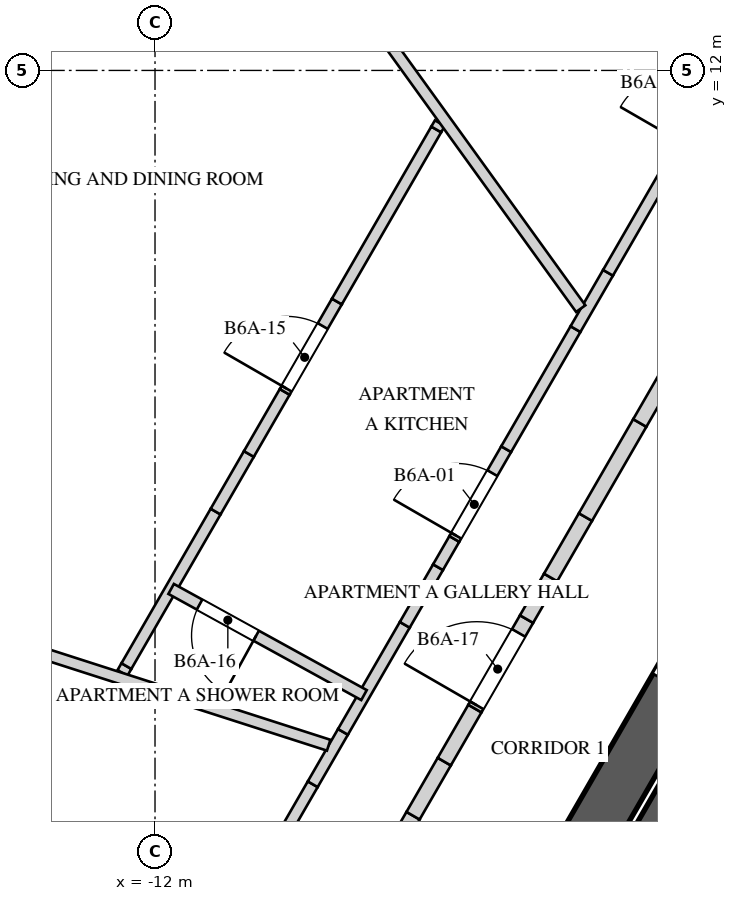
"""IFC4 building model, lengths in metres.
Left out: names, types, materials, properties, quantities, classifications, styles, units other than length and angle.
Written with IfcOpenShell. Run it as: python <this file> out.ifc"""

import sys

from ifc_helpers import new_model, si_unit, direction, frame, frame_2d, origin, place, context, subcontext, project, spatial, polyline, rectangle, outline, extrude, element, fill, save


model = new_model("IFC4")
c1 = context("Model", 3, precision=1e-05, world=origin(), true_north=direction((0.0, 1.0)))
c2 = subcontext(c1, "Body", "Model", "MODEL_VIEW")
j1 = project(units=[si_unit("LENGTHUNIT", "METRE"), si_unit("PLANEANGLEUNIT", "RADIAN")], contexts=[c1])
p1 = place(None, origin())
s1 = spatial("IfcSite", under=j1, at=p1, CompositionType="ELEMENT")
p2 = place(p1, origin())
s2 = spatial("IfcBuilding", under=s1, at=p2, CompositionType="ELEMENT")
p3 = place(p2, frame((0.0, 0.0, 245.2)))
s3 = spatial("IfcBuildingStorey", under=s2, at=p3, CompositionType="ELEMENT", Elevation=245.2)
p4 = place(p3, frame((-1.241, 10.65, 0.0), z_axis=(0.0, 0.0, 1.0), x_axis=(-0.500003331888, -0.866023480109, 0.0)))
e1 = element("IfcWall", 1, at=p4, inside=s3, PredefinedType="SHEAR", context=c2, shape_type="SweptSolid", body=[
    extrude(rectangle(XDim=17.205, YDim=0.7, at=frame_2d((8.603, 0.0))), origin(), (0.0, 0.0, 1.0), 4.0),
])
p5 = place(p4, frame((6.808, 0.0, 0.0)))
e2 = element("IfcOpeningElement", 2, at=p5, cuts=e1, PredefinedType="OPENING", context=c2, shape_type="SweptSolid", body=[
    extrude(rectangle(XDim=1.0, YDim=2.4, at=frame_2d((0.5, 1.2))), frame((0.0, 0.36, 0.0), z_axis=(0.0, -1.0, 0.0), x_axis=(1.0, 0.0, 0.0)), (0.0, 0.0, 1.0), 0.72),
])
p6 = place(p4, frame((14.922, 0.0, 0.0)))
e3 = element("IfcOpeningElement", 3, at=p6, cuts=e1, PredefinedType="OPENING", context=c2, shape_type="SweptSolid", body=[
    extrude(rectangle(XDim=0.8, YDim=2.1, at=frame_2d((0.4, 1.05))), frame((0.0, 0.36, 0.0), z_axis=(0.0, -1.0, 0.0), x_axis=(1.0, 0.0, 0.0)), (0.0, 0.0, 1.0), 0.72),
])
p7 = place(p3, frame((-4.538, 3.44, 0.0), z_axis=(0.0, 0.0, 1.0), x_axis=(-0.499996545922, -0.866027397988, 0.0)))
e4 = element("IfcWall", 4, at=p7, inside=s3, PredefinedType="SOLIDWALL", context=c2, shape_type="SweptSolid", body=[
    extrude(rectangle(XDim=5.5, YDim=0.6, at=frame_2d((2.75, 0.0))), origin(), (0.0, 0.0, 1.0), 3.65),
])
p8 = place(p3, frame((-12.213, -1.354, 0.0), z_axis=(0.0, 0.0, 1.0), x_axis=(0.500001111708, 0.866024761939, 0.0)))
e5 = element("IfcWall", 5, at=p8, inside=s3, PredefinedType="PARTITIONING", context=c2, shape_type="SweptSolid", body=[
    extrude(rectangle(XDim=4.576, YDim=0.15, at=frame_2d((2.288, 0.0))), origin(), (0.0, 0.0, 1.0), 3.65),
])
p9 = place(p8, frame((0.445, 0.0, 0.0)))
e6 = element("IfcOpeningElement", 6, at=p9, cuts=e5, PredefinedType="OPENING", context=c2, shape_type="SweptSolid", body=[
    extrude(rectangle(XDim=0.95, YDim=2.4, at=frame_2d((0.475, 1.2))), frame((0.0, 0.085, 0.0), z_axis=(0.0, -1.0, 0.0), x_axis=(1.0, 0.0, 0.0)), (0.0, 0.0, 1.0), 0.17),
])
p10 = place(p3, frame((-9.925, 2.609, 0.0), z_axis=(0.0, 0.0, 1.0), x_axis=(0.499802134818, 0.866139611167, 0.0)))
e7 = element("IfcWall", 7, at=p10, inside=s3, PredefinedType="PARTITIONING", context=c2, shape_type="SweptSolid", body=[
    extrude(rectangle(XDim=0.796, YDim=0.15, at=frame_2d((0.398, 0.0))), origin(), (0.0, 0.0, 1.0), 2.75),
])
p11 = place(p3, frame((-9.527, 3.298, 0.0), z_axis=(0.0, 0.0, 1.0), x_axis=(0.500094991843, 0.865970553272, 0.0)))
e8 = element("IfcWall", 8, at=p11, inside=s3, PredefinedType="PARTITIONING", context=c2, shape_type="SweptSolid", body=[
    extrude(rectangle(XDim=1.626, YDim=0.15, at=frame_2d((0.813, 0.0))), origin(), (0.0, 0.0, 1.0), 3.65),
])
p12 = place(p3, frame((-8.714, 4.707, 0.0), z_axis=(0.0, 0.0, 1.0), x_axis=(0.499859285417, 0.866106630146, 0.0)))
e9 = element("IfcWall", 9, at=p12, inside=s3, PredefinedType="PARTITIONING", context=c2, shape_type="SweptSolid", body=[
    extrude(rectangle(XDim=0.875, YDim=0.15, at=frame_2d((0.438, 0.0))), origin(), (0.0, 0.0, 1.0), 2.55),
])
p13 = place(p3, frame((-8.277, 5.465, 0.0), z_axis=(0.0, 0.0, 1.0), x_axis=(0.500116443366, 0.865958164737, 0.0)))
e10 = element("IfcWall", 10, at=p13, inside=s3, PredefinedType="PARTITIONING", context=c2, shape_type="SweptSolid", body=[
    extrude(rectangle(XDim=0.429, YDim=0.15, at=frame_2d((0.215, 0.0))), origin(), (0.0, 0.0, 1.0), 3.65),
])
p14 = place(p3, frame((-8.062, 5.836, 0.0), z_axis=(0.0, 0.0, 1.0), x_axis=(0.499970382458, 0.866042502805, 0.0)))
e11 = element("IfcWall", 11, at=p14, inside=s3, PredefinedType="PARTITIONING", context=c2, shape_type="SweptSolid", body=[
    extrude(outline(polyline([(0.0, 0.0), (1.364, 0.0), (1.364, 2.55), (0.472, 2.55), (0.472, 3.65), (0.0, 3.65), (0.0, 0.0)])), frame((0.0, 0.075, 0.0), z_axis=(0.0, -1.0, 0.0), x_axis=(1.0, 0.0, 0.0)), (0.0, 0.0, 1.0), 0.15),
])
p15 = place(p14, frame((0.05, 0.0, 0.0)))
e12 = element("IfcOpeningElement", 12, at=p15, cuts=e11, PredefinedType="OPENING", context=c2, shape_type="SweptSolid", body=[
    extrude(rectangle(XDim=0.95, YDim=2.4, at=frame_2d((0.475, 1.2))), frame((0.0, 0.085, 0.0), z_axis=(0.0, -1.0, 0.0), x_axis=(1.0, 0.0, 0.0)), (0.0, 0.0, 1.0), 0.17),
])
p16 = place(p3, frame((-7.38, 7.017, 0.0), z_axis=(0.0, 0.0, 1.0), x_axis=(0.500012159746, 0.866018383238, 0.0)))
e13 = element("IfcWall", 13, at=p16, inside=s3, PredefinedType="PARTITIONING", context=c2, shape_type="SweptSolid", body=[
    extrude(rectangle(XDim=1.824, YDim=0.15, at=frame_2d((0.912, 0.0))), origin(), (0.0, 0.0, 1.0), 3.65),
])
p17 = place(p3, frame((-6.468, 8.597, 0.0), z_axis=(0.0, 0.0, 1.0), x_axis=(0.500035209441, 0.86600507465, 0.0)))
e14 = element("IfcWall", 14, at=p17, inside=s3, PredefinedType="PARTITIONING", context=c2, shape_type="SweptSolid", body=[
    extrude(rectangle(XDim=0.856, YDim=0.15, at=frame_2d((0.428, 0.0))), origin(), (0.0, 0.0, 1.0), 2.75),
])
p18 = place(p3, frame((-6.04, 9.338, 0.0), z_axis=(0.0, 0.0, 1.0), x_axis=(0.500014044516, 0.866017295027, 0.0)))
e15 = element("IfcWall", 15, at=p18, inside=s3, PredefinedType="PARTITIONING", context=c2, shape_type="SweptSolid", body=[
    extrude(rectangle(XDim=5.556, YDim=0.15, at=frame_2d((2.778, 0.0))), origin(), (0.0, 0.0, 1.0), 3.65),
])
p19 = place(p18, frame((1.971, 0.0, 0.0)))
e16 = element("IfcOpeningElement", 16, at=p19, cuts=e15, PredefinedType="OPENING", context=c2, shape_type="SweptSolid", body=[
    extrude(rectangle(XDim=0.95, YDim=2.4, at=frame_2d((0.475, 1.2))), frame((0.0, 0.085, 0.0), z_axis=(0.0, -1.0, 0.0), x_axis=(1.0, 0.0, 0.0)), (0.0, 0.0, 1.0), 0.17),
])
p20 = place(p3, frame((-12.428, 4.074, 0.0), z_axis=(0.0, 0.0, 1.0), x_axis=(0.500943559977, 0.865479953388, 0.0)))
e17 = element("IfcWall", 17, at=p20, inside=s3, PredefinedType="PARTITIONING", context=c2, shape_type="SweptSolid", body=[
    extrude(rectangle(XDim=0.104, YDim=0.15, at=frame_2d((0.052, 0.0))), origin(), (0.0, 0.0, 1.0), 2.75),
])
p21 = place(p3, frame((-12.376, 4.164, 0.0), z_axis=(0.0, 0.0, 1.0), x_axis=(0.499998569178, 0.866026229868, 0.0)))
e18 = element("IfcWall", 18, at=p21, inside=s3, PredefinedType="PARTITIONING", context=c2, shape_type="SweptSolid", body=[
    extrude(rectangle(XDim=2.347, YDim=0.15, at=frame_2d((1.174, 0.0))), origin(), (0.0, 0.0, 1.0), 3.65),
])
p22 = place(p3, frame((-11.203, 6.196, 0.0), z_axis=(0.0, 0.0, 1.0), x_axis=(0.499980071345, 0.866036909293, 0.0)))
e19 = element("IfcWall", 19, at=p22, inside=s3, PredefinedType="PARTITIONING", context=c2, shape_type="SweptSolid", body=[
    extrude(rectangle(XDim=0.875, YDim=0.15, at=frame_2d((0.438, 0.0))), origin(), (0.0, 0.0, 1.0), 2.55),
])
p23 = place(p3, frame((-10.765, 6.954, 0.0), z_axis=(0.0, 0.0, 1.0), x_axis=(0.499841962787, 0.866116627388, 0.0)))
e20 = element("IfcWall", 20, at=p23, inside=s3, PredefinedType="PARTITIONING", context=c2, shape_type="SweptSolid", body=[
    extrude(rectangle(XDim=0.943, YDim=0.15, at=frame_2d((0.472, 0.0))), origin(), (0.0, 0.0, 1.0), 3.65),
])
p24 = place(p3, frame((-10.294, 7.771, 0.0), z_axis=(0.0, 0.0, 1.0), x_axis=(0.500117582512, 0.865957506846, 0.0)))
e21 = element("IfcWall", 21, at=p24, inside=s3, PredefinedType="PARTITIONING", context=c2, shape_type="SweptSolid", body=[
    extrude(outline(polyline([(0.0, 0.0), (1.373, 0.0), (1.373, 2.55), (0.481, 2.55), (0.481, 3.65), (0.0, 3.65), (0.0, 0.0)])), frame((0.0, 0.075, 0.0), z_axis=(0.0, -1.0, 0.0), x_axis=(1.0, 0.0, 0.0)), (0.0, 0.0, 1.0), 0.15),
])
p25 = place(p24, frame((0.05, 0.0, 0.0)))
e22 = element("IfcOpeningElement", 22, at=p25, cuts=e21, PredefinedType="OPENING", context=c2, shape_type="SweptSolid", body=[
    extrude(rectangle(XDim=0.95, YDim=2.4, at=frame_2d((0.475, 1.2))), frame((0.0, 0.085, 0.0), z_axis=(0.0, -1.0, 0.0), x_axis=(1.0, 0.0, 0.0)), (0.0, 0.0, 1.0), 0.17),
])
p26 = place(p3, frame((-9.607, 8.96, 0.0), z_axis=(0.0, 0.0, 1.0), x_axis=(0.49994612994, 0.866056503444, 0.0)))
e23 = element("IfcWall", 23, at=p26, inside=s3, PredefinedType="PARTITIONING", context=c2, shape_type="SweptSolid", body=[
    extrude(rectangle(XDim=2.614, YDim=0.15, at=frame_2d((1.307, 0.0))), origin(), (0.0, 0.0, 1.0), 3.65),
])
p27 = place(p3, frame((-8.3, 11.224, 0.0), z_axis=(0.0, 0.0, 1.0), x_axis=(0.501641482138, 0.865075617156, 0.0)))
e24 = element("IfcWall", 24, at=p27, inside=s3, PredefinedType="PARTITIONING", context=c2, shape_type="SweptSolid", body=[
    extrude(rectangle(XDim=0.095, YDim=0.15, at=frame_2d((0.048, 0.0))), origin(), (0.0, 0.0, 1.0), 2.75),
])
p28 = place(p3, frame((-11.858, 16.429, 0.0), z_axis=(0.0, 0.0, 1.0), x_axis=(0.585232485498, -0.810865548607, 0.0)))
e25 = element("IfcWall", 25, at=p28, inside=s3, PredefinedType="PARTITIONING", context=c2, shape_type="SweptSolid", body=[
    extrude(rectangle(XDim=9.327, YDim=0.15, at=frame_2d((4.664, 0.0))), origin(), (0.0, 0.0, 1.0), 2.75),
])
p29 = place(p3, frame((-9.715, 3.123, 0.0), z_axis=(0.0, 0.0, 1.0), x_axis=(-0.952031844805, 0.305998964831, 0.0)))
e26 = element("IfcWall", 26, at=p29, inside=s3, PredefinedType="PARTITIONING", context=c2, shape_type="SweptSolid", body=[
    extrude(rectangle(XDim=10.057, YDim=0.15, at=frame_2d((5.028, 0.0))), origin(), (0.0, 0.0, 1.0), 2.75),
])
p30 = place(p3, frame((-9.25, 3.782, 0.0), z_axis=(0.0, 0.0, 1.0), x_axis=(-0.876043224435, 0.482232587991, 0.0)))
e27 = element("IfcWall", 27, at=p30, inside=s3, PredefinedType="PARTITIONING", context=c2, shape_type="SweptSolid", body=[
    extrude(rectangle(XDim=2.896, YDim=0.15, at=frame_2d((1.448, 0.0))), origin(), (0.0, 0.0, 1.0), 3.65),
])
p31 = place(p30, frame((1.62, 0.0, 0.0)))
e28 = element("IfcOpeningElement", 28, at=p31, cuts=e27, PredefinedType="OPENING", context=c2, shape_type="SweptSolid", body=[
    extrude(rectangle(XDim=0.85, YDim=2.4, at=frame_2d((0.425, 1.2))), frame((0.0, 0.085, 0.0), z_axis=(0.0, -1.0, 0.0), x_axis=(1.0, 0.0, 0.0)), (0.0, 0.0, 1.0), 0.17),
])
p32 = place(p3, frame((-10.51, -1.105, 0.0), z_axis=(0.0, 0.0, 1.0), x_axis=(0.499997905474, 0.866026613056, 0.0)))
e29 = element("IfcWall", 29, at=p32, inside=s3, PredefinedType="SOLIDWALL", context=c2, shape_type="SweptSolid", body=[
    extrude(rectangle(XDim=3.811, YDim=0.2, at=frame_2d((1.905, 0.0))), origin(), (0.0, 0.0, 1.0), 3.65),
])
p33 = place(p3, frame((-8.605, 2.195, 0.0), z_axis=(0.0, 0.0, 1.0), x_axis=(0.499911126926, 0.866076708598, 0.0)))
e30 = element("IfcWall", 30, at=p33, inside=s3, PredefinedType="SOLIDWALL", context=c2, shape_type="SweptSolid", body=[
    extrude(rectangle(XDim=0.822, YDim=0.2, at=frame_2d((0.411, 0.0))), origin(), (0.0, 0.0, 1.0), 2.75),
])
p34 = place(p3, frame((-8.195, 2.907, 0.0), z_axis=(0.0, 0.0, 1.0), x_axis=(0.500211976125, 0.865902984716, 0.0)))
e31 = element("IfcWall", 31, at=p34, inside=s3, PredefinedType="SOLIDWALL", context=c2, shape_type="SweptSolid", body=[
    extrude(rectangle(XDim=0.806, YDim=0.2, at=frame_2d((0.403, 0.0))), origin(), (0.0, 0.0, 1.0), 3.65),
])
p35 = place(p3, frame((-7.792, 3.604, 0.0), z_axis=(0.0, 0.0, 1.0), x_axis=(0.500002290144, 0.866024081565, 0.0)))
e32 = element("IfcWall", 32, at=p35, inside=s3, PredefinedType="SOLIDWALL", context=c2, shape_type="SweptSolid", body=[
    extrude(outline(polyline([(0.0, 0.0), (1.359, 0.0), (1.359, 2.55), (0.459, 2.55), (0.459, 3.65), (0.0, 3.65), (0.0, 0.0)])), frame((0.0, 0.1, 0.0), z_axis=(0.0, -1.0, 0.0), x_axis=(1.0, 0.0, 0.0)), (0.0, 0.0, 1.0), 0.2),
])
p36 = place(p35, frame((0.05, 0.0, 0.0)))
e33 = element("IfcOpeningElement", 33, at=p36, cuts=e32, PredefinedType="OPENING", context=c2, shape_type="SweptSolid", body=[
    extrude(rectangle(XDim=1.1, YDim=2.4, at=frame_2d((0.55, 1.2))), frame((0.0, 0.11, 0.0), z_axis=(0.0, -1.0, 0.0), x_axis=(1.0, 0.0, 0.0)), (0.0, 0.0, 1.0), 0.22),
])
p37 = place(p3, frame((-7.112, 4.782, 0.0), z_axis=(0.0, 0.0, 1.0), x_axis=(0.499956208541, 0.866050685319, 0.0)))
e34 = element("IfcWall", 34, at=p37, inside=s3, PredefinedType="SOLIDWALL", context=c2, shape_type="SweptSolid", body=[
    extrude(rectangle(XDim=0.633, YDim=0.2, at=frame_2d((0.316, 0.0))), origin(), (0.0, 0.0, 1.0), 3.65),
])
p38 = place(p3, frame((-6.795, 5.33, 0.0), z_axis=(0.0, 0.0, 1.0), x_axis=(0.499975954304, 0.866039286129, 0.0)))
e35 = element("IfcWall", 35, at=p38, inside=s3, PredefinedType="SOLIDWALL", context=c2, shape_type="SweptSolid", body=[
    extrude(rectangle(XDim=0.917, YDim=0.2, at=frame_2d((0.458, 0.0))), origin(), (0.0, 0.0, 1.0), 2.55),
])
p39 = place(p3, frame((-6.337, 6.124, 0.0), z_axis=(0.0, 0.0, 1.0), x_axis=(0.499904796234, 0.866080362727, 0.0)))
e36 = element("IfcWall", 36, at=p39, inside=s3, PredefinedType="SOLIDWALL", context=c2, shape_type="SweptSolid", body=[
    extrude(rectangle(XDim=1.429, YDim=0.2, at=frame_2d((0.715, 0.0))), origin(), (0.0, 0.0, 1.0), 3.65),
])
p40 = place(p3, frame((-5.622, 7.362, 0.0), z_axis=(0.0, 0.0, 1.0), x_axis=(0.500121072013, 0.86595549154, 0.0)))
e37 = element("IfcWall", 37, at=p40, inside=s3, PredefinedType="SOLIDWALL", context=c2, shape_type="SweptSolid", body=[
    extrude(rectangle(XDim=0.884, YDim=0.2, at=frame_2d((0.442, 0.0))), origin(), (0.0, 0.0, 1.0), 2.75),
])
p41 = place(p15, origin())
e38 = element("IfcDoor", 38, at=p41, inside=s3, OperationType="SINGLE_SWING_LEFT", PredefinedType="DOOR", context=c2, shape_type="SweptSolid", body=[
    extrude(rectangle(XDim=0.95, YDim=2.4, at=frame_2d((0.475, 1.2))), frame((0.0, 0.025, 0.0), z_axis=(0.0, -1.0, 0.0), x_axis=(1.0, 0.0, 0.0)), (0.0, 0.0, 1.0), 0.05),
])
fill(e12, e38)
p42 = place(p25, origin())
e39 = element("IfcDoor", 39, at=p42, inside=s3, OperationType="SINGLE_SWING_LEFT", PredefinedType="DOOR", context=c2, shape_type="SweptSolid", body=[
    extrude(rectangle(XDim=0.95, YDim=2.4, at=frame_2d((0.475, 1.2))), frame((0.0, 0.025, 0.0), z_axis=(0.0, -1.0, 0.0), x_axis=(1.0, 0.0, 0.0)), (0.0, 0.0, 1.0), 0.05),
])
fill(e22, e39)
p43 = place(p31, origin())
e40 = element("IfcDoor", 40, at=p43, inside=s3, OperationType="SINGLE_SWING_RIGHT", PredefinedType="DOOR", context=c2, shape_type="SweptSolid", body=[
    extrude(rectangle(XDim=0.85, YDim=2.4, at=frame_2d((0.425, 1.2))), frame((0.0, 0.025, 0.0), z_axis=(0.0, -1.0, 0.0), x_axis=(1.0, 0.0, 0.0)), (0.0, 0.0, 1.0), 0.05),
])
fill(e28, e40)
p44 = place(p36, origin())
e41 = element("IfcDoor", 41, at=p44, inside=s3, OperationType="SINGLE_SWING_LEFT", PredefinedType="DOOR", context=c2, shape_type="SweptSolid", body=[
    extrude(rectangle(XDim=1.1, YDim=2.4, at=frame_2d((0.55, 1.2))), frame((0.0, 0.025, 0.0), z_axis=(0.0, -1.0, 0.0), x_axis=(1.0, 0.0, 0.0)), (0.0, 0.0, 1.0), 0.05),
])
fill(e33, e41)
save(model, sys.argv[1])
